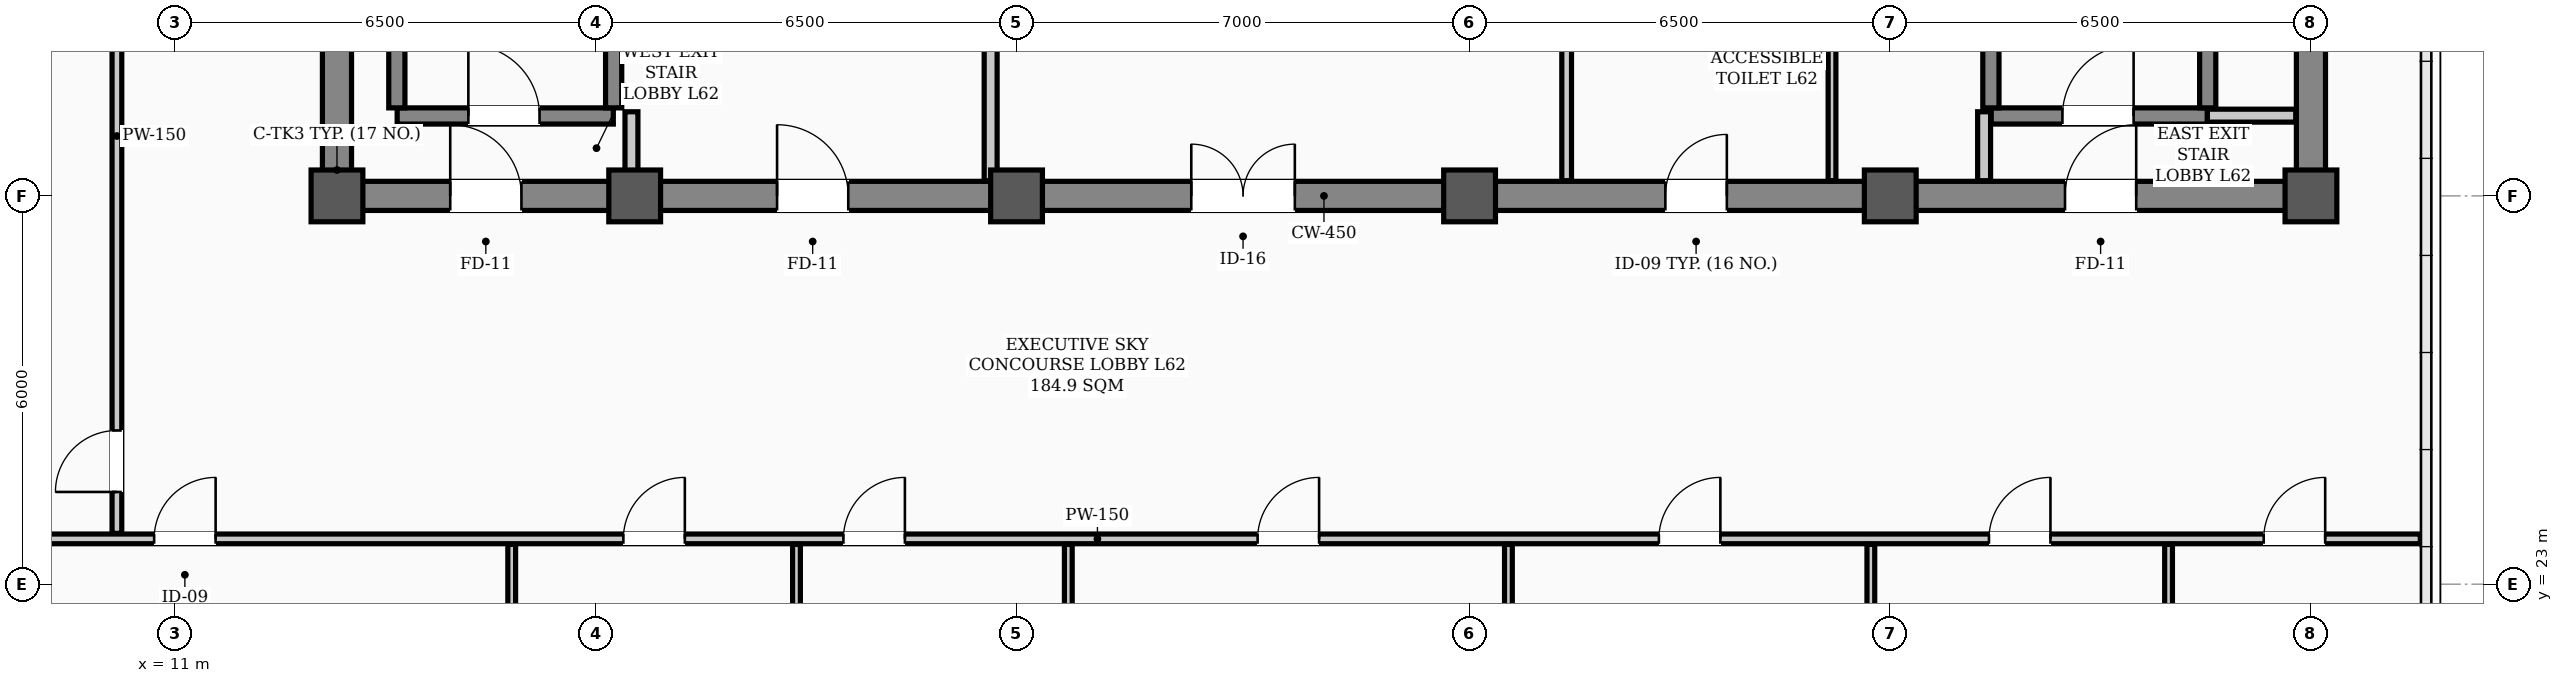
"""IFC4 building model, lengths in metres.
Left out: names, types, materials, properties, quantities, classifications, styles, units other than length and angle.
Written with IfcOpenShell. Run it as: python <this file> out.ifc"""

import sys

from ifc_helpers import new_model, si_unit, direction, frame, frame_2d, origin, origin_2d, place, context, subcontext, project, spatial, rectangle, hollow_rectangle, extrude, element, fill, save


model = new_model("IFC4")
c1 = context("Model", 3, precision=1e-05, world=origin(), true_north=direction((0.0, 1.0)))
c2 = subcontext(c1, "Body", "Model", "MODEL_VIEW")
j1 = project(units=[si_unit("LENGTHUNIT", "METRE"), si_unit("PLANEANGLEUNIT", "RADIAN")], contexts=[c1])
p1 = place(None, origin())
s1 = spatial("IfcSite", under=j1, at=p1, CompositionType="ELEMENT")
p2 = place(p1, origin())
s2 = spatial("IfcBuilding", under=s1, at=p2, CompositionType="ELEMENT")
p3 = place(p2, frame((0.0, 0.0, 250.1)))
s3 = spatial("IfcBuildingStorey", under=s2, at=p3, CompositionType="ELEMENT", Elevation=250.1)
for number, where, z_axis, x_axis in (
    (1, (13.5, 29.0, 0.0), (0.0, 0.0, 1.0), (1.0, 0.0, 0.0)),
    (2, (18.1, 29.0, 0.0), (0.0, 0.0, 1.0), (1.0, 0.0, 0.0)),
    (3, (24.0, 29.0, 0.0), (0.0, 0.0, 1.0), (1.0, 0.0, 0.0)),
    (4, (31.0, 29.0, 0.0), (0.0, 0.0, 1.0), (1.0, 0.0, 0.0)),
    (5, (37.5, 29.0, 0.0), (0.0, 0.0, 1.0), (1.0, 0.0, 0.0)),
    (6, (44.0, 29.0, 0.0), (0.0, 0.0, 1.0), (1.0, 0.0, 0.0)),
):
    element("IfcColumn", number, at=place(p3, frame(where, z_axis=z_axis, x_axis=x_axis)), inside=s3, PredefinedType="COLUMN", context=c2, shape_type="SweptSolid", body=[
        extrude(hollow_rectangle(XDim=0.8, YDim=0.8, WallThickness=0.032, InnerFilletRadius=0.016, OuterFilletRadius=0.048, at=origin_2d()), origin(), (0.0, 0.0, 1.0), 3.9),
    ])
p4 = place(p3, frame((13.5, 29.0, 0.0), z_axis=(0.0, 0.0, 1.0), x_axis=(1.0, 0.0, 0.0)))
e7 = element("IfcWall", 7, at=p4, inside=s3, PredefinedType="SHEAR", context=c2, shape_type="SweptSolid", body=[
    extrude(rectangle(XDim=30.5, YDim=0.45, at=frame_2d((15.25, 0.0))), origin(), (0.0, 0.0, 1.0), 3.72),
])
p5 = place(p4, frame((1.75, 0.0, 0.0)))
e8 = element("IfcOpeningElement", 8, at=p5, cuts=e7, PredefinedType="OPENING", context=c2, shape_type="SweptSolid", body=[
    extrude(rectangle(XDim=1.1, YDim=2.08, at=frame_2d((0.55, 1.04))), frame((0.0, 0.235, 0.0), z_axis=(0.0, -1.0, 0.0), x_axis=(1.0, 0.0, 0.0)), (0.0, 0.0, 1.0), 0.47),
])
p6 = place(p4, frame((26.7, 0.0, 0.0)))
e9 = element("IfcOpeningElement", 9, at=p6, cuts=e7, PredefinedType="OPENING", context=c2, shape_type="SweptSolid", body=[
    extrude(rectangle(XDim=1.1, YDim=2.08, at=frame_2d((0.55, 1.04))), frame((0.0, 0.235, 0.0), z_axis=(0.0, -1.0, 0.0), x_axis=(1.0, 0.0, 0.0)), (0.0, 0.0, 1.0), 0.47),
])
p7 = place(p4, frame((6.8, 0.0, 0.0)))
e10 = element("IfcOpeningElement", 10, at=p7, cuts=e7, PredefinedType="OPENING", context=c2, shape_type="SweptSolid", body=[
    extrude(rectangle(XDim=1.1, YDim=2.08, at=frame_2d((0.55, 1.04))), frame((0.0, 0.235, 0.0), z_axis=(0.0, -1.0, 0.0), x_axis=(1.0, 0.0, 0.0)), (0.0, 0.0, 1.0), 0.47),
])
p8 = place(p4, frame((13.2, 0.0, 0.0)))
e11 = element("IfcOpeningElement", 11, at=p8, cuts=e7, PredefinedType="OPENING", context=c2, shape_type="SweptSolid", body=[
    extrude(rectangle(XDim=1.6, YDim=2.08, at=frame_2d((0.8, 1.04))), frame((0.0, 0.235, 0.0), z_axis=(0.0, -1.0, 0.0), x_axis=(1.0, 0.0, 0.0)), (0.0, 0.0, 1.0), 0.47),
])
p9 = place(p4, frame((20.525, 0.0, 0.0)))
e12 = element("IfcOpeningElement", 12, at=p9, cuts=e7, PredefinedType="OPENING", context=c2, shape_type="SweptSolid", body=[
    extrude(rectangle(XDim=0.95, YDim=2.08, at=frame_2d((0.475, 1.04))), frame((0.0, 0.235, 0.0), z_axis=(0.0, -1.0, 0.0), x_axis=(1.0, 0.0, 0.0)), (0.0, 0.0, 1.0), 0.47),
])
for number, where, z_axis, x_axis in (
    (13, (13.5, 29.35, 0.0), (0.0, 0.0, 1.0), (0.0, 1.0, 0.0)),
    (14, (44.0, 29.35, 0.0), (0.0, 0.0, 1.0), (0.0, 1.0, 0.0)),
):
    element("IfcWall", number, at=place(p3, frame(where, z_axis=z_axis, x_axis=x_axis)), inside=s3, PredefinedType="SHEAR", context=c2, shape_type="SweptSolid", body=[
        extrude(rectangle(XDim=8.6, YDim=0.45, at=frame_2d((4.3, 0.0))), origin(), (0.0, 0.0, 1.0), 3.72),
    ])
p10 = place(p3, frame((14.43, 30.235, 0.0), z_axis=(0.0, 0.0, 1.0), x_axis=(1.0, 0.0, 0.0)))
e15 = element("IfcWall", 15, at=p10, inside=s3, PredefinedType="STANDARD", context=c2, shape_type="SweptSolid", body=[
    extrude(rectangle(XDim=3.34, YDim=0.25, at=frame_2d((1.67, 0.0))), origin(), (0.0, 0.0, 1.0), 3.72),
])
p11 = place(p10, frame((1.1, 0.0, 0.0)))
e16 = element("IfcOpeningElement", 16, at=p11, cuts=e15, PredefinedType="OPENING", context=c2, shape_type="SweptSolid", body=[
    extrude(rectangle(XDim=1.1, YDim=2.08, at=frame_2d((0.55, 1.04))), frame((0.0, 0.135, 0.0), z_axis=(0.0, -1.0, 0.0), x_axis=(1.0, 0.0, 0.0)), (0.0, 0.0, 1.0), 0.27),
])
for number, where, z_axis, x_axis in (
    (17, (14.425, 30.36, 0.0), (0.0, 0.0, 1.0), (0.0, 1.0, 0.0)),
    (18, (17.775, 30.36, 0.0), (0.0, 0.0, 1.0), (0.0, 1.0, 0.0)),
):
    element("IfcWall", number, at=place(p3, frame(where, z_axis=z_axis, x_axis=x_axis)), inside=s3, PredefinedType="STANDARD", context=c2, shape_type="SweptSolid", body=[
        extrude(rectangle(XDim=7.184, YDim=0.25, at=frame_2d((3.592, 0.0))), origin(), (0.0, 0.0, 1.0), 3.72),
    ])
p12 = place(p3, frame((39.06, 30.235, 0.0), z_axis=(0.0, 0.0, 1.0), x_axis=(1.0, 0.0, 0.0)))
e19 = element("IfcWall", 19, at=p12, inside=s3, PredefinedType="STANDARD", context=c2, shape_type="SweptSolid", body=[
    extrude(rectangle(XDim=3.34, YDim=0.25, at=frame_2d((1.67, 0.0))), origin(), (0.0, 0.0, 1.0), 3.72),
])
p13 = place(p12, frame((1.1, 0.0, 0.0)))
e20 = element("IfcOpeningElement", 20, at=p13, cuts=e19, PredefinedType="OPENING", context=c2, shape_type="SweptSolid", body=[
    extrude(rectangle(XDim=1.1, YDim=2.08, at=frame_2d((0.55, 1.04))), frame((0.0, 0.135, 0.0), z_axis=(0.0, -1.0, 0.0), x_axis=(1.0, 0.0, 0.0)), (0.0, 0.0, 1.0), 0.27),
])
for number, where, z_axis, x_axis in (
    (21, (39.055, 30.36, 0.0), (0.0, 0.0, 1.0), (0.0, 1.0, 0.0)),
    (22, (42.405, 30.36, 0.0), (0.0, 0.0, 1.0), (0.0, 1.0, 0.0)),
):
    element("IfcWall", number, at=place(p3, frame(where, z_axis=z_axis, x_axis=x_axis)), inside=s3, PredefinedType="STANDARD", context=c2, shape_type="SweptSolid", body=[
        extrude(rectangle(XDim=7.184, YDim=0.25, at=frame_2d((3.592, 0.0))), origin(), (0.0, 0.0, 1.0), 3.72),
    ])
p14 = place(p3, frame((42.4, 30.24, 0.0), z_axis=(0.0, 0.0, 1.0), x_axis=(1.0, 0.0, 0.0)))
e23 = element("IfcWall", 23, at=p14, inside=s3, PredefinedType="STANDARD", context=c2, shape_type="SweptSolid", body=[
    extrude(rectangle(XDim=1.365, YDim=0.2, at=frame_2d((0.683, 0.0))), origin(), (0.0, 0.0, 1.0), 3.72),
])
p15 = place(p3, frame((4.81, 23.7, 0.0), z_axis=(0.0, 0.0, 1.0), x_axis=(1.0, 0.0, 0.0)))
e24 = element("IfcWall", 24, at=p15, inside=s3, PredefinedType="PARTITIONING", context=c2, shape_type="SweptSolid", body=[
    extrude(rectangle(XDim=40.88, YDim=0.15, at=frame_2d((20.44, 0.0))), origin(), (0.0, 0.0, 1.0), 3.2),
])
p16 = place(p15, frame((5.865, 0.0, 0.0)))
e25 = element("IfcOpeningElement", 25, at=p16, cuts=e24, PredefinedType="OPENING", context=c2, shape_type="SweptSolid", body=[
    extrude(rectangle(XDim=0.95, YDim=2.08, at=frame_2d((0.475, 1.04))), frame((0.0, 0.085, 0.0), z_axis=(0.0, -1.0, 0.0), x_axis=(1.0, 0.0, 0.0)), (0.0, 0.0, 1.0), 0.17),
])
p17 = place(p15, frame((13.115, 0.0, 0.0)))
e26 = element("IfcOpeningElement", 26, at=p17, cuts=e24, PredefinedType="OPENING", context=c2, shape_type="SweptSolid", body=[
    extrude(rectangle(XDim=0.95, YDim=2.08, at=frame_2d((0.475, 1.04))), frame((0.0, 0.085, 0.0), z_axis=(0.0, -1.0, 0.0), x_axis=(1.0, 0.0, 0.0)), (0.0, 0.0, 1.0), 0.17),
])
p18 = place(p15, frame((16.515, 0.0, 0.0)))
e27 = element("IfcOpeningElement", 27, at=p18, cuts=e24, PredefinedType="OPENING", context=c2, shape_type="SweptSolid", body=[
    extrude(rectangle(XDim=0.95, YDim=2.08, at=frame_2d((0.475, 1.04))), frame((0.0, 0.085, 0.0), z_axis=(0.0, -1.0, 0.0), x_axis=(1.0, 0.0, 0.0)), (0.0, 0.0, 1.0), 0.17),
])
p19 = place(p15, frame((22.915, 0.0, 0.0)))
e28 = element("IfcOpeningElement", 28, at=p19, cuts=e24, PredefinedType="OPENING", context=c2, shape_type="SweptSolid", body=[
    extrude(rectangle(XDim=0.95, YDim=2.08, at=frame_2d((0.475, 1.04))), frame((0.0, 0.085, 0.0), z_axis=(0.0, -1.0, 0.0), x_axis=(1.0, 0.0, 0.0)), (0.0, 0.0, 1.0), 0.17),
])
p20 = place(p15, frame((29.115, 0.0, 0.0)))
e29 = element("IfcOpeningElement", 29, at=p20, cuts=e24, PredefinedType="OPENING", context=c2, shape_type="SweptSolid", body=[
    extrude(rectangle(XDim=0.95, YDim=2.08, at=frame_2d((0.475, 1.04))), frame((0.0, 0.085, 0.0), z_axis=(0.0, -1.0, 0.0), x_axis=(1.0, 0.0, 0.0)), (0.0, 0.0, 1.0), 0.17),
])
p21 = place(p15, frame((34.215, 0.0, 0.0)))
e30 = element("IfcOpeningElement", 30, at=p21, cuts=e24, PredefinedType="OPENING", context=c2, shape_type="SweptSolid", body=[
    extrude(rectangle(XDim=0.95, YDim=2.08, at=frame_2d((0.475, 1.04))), frame((0.0, 0.085, 0.0), z_axis=(0.0, -1.0, 0.0), x_axis=(1.0, 0.0, 0.0)), (0.0, 0.0, 1.0), 0.17),
])
p22 = place(p15, frame((38.46, 0.0, 0.0)))
e31 = element("IfcOpeningElement", 31, at=p22, cuts=e24, PredefinedType="OPENING", context=c2, shape_type="SweptSolid", body=[
    extrude(rectangle(XDim=0.95, YDim=2.08, at=frame_2d((0.475, 1.04))), frame((0.0, 0.085, 0.0), z_axis=(0.0, -1.0, 0.0), x_axis=(1.0, 0.0, 0.0)), (0.0, 0.0, 1.0), 0.17),
])
p23 = place(p3, frame((18.05, 29.235, 0.0), z_axis=(0.0, 0.0, 1.0), x_axis=(0.0, 1.0, 0.0)))
e32 = element("IfcWall", 32, at=p23, inside=s3, PredefinedType="STANDARD", context=c2, shape_type="SweptSolid", body=[
    extrude(rectangle(XDim=1.065, YDim=0.2, at=frame_2d((0.532, 0.0))), origin(), (0.0, 0.0, 1.0), 3.35),
])
p24 = place(p3, frame((38.95, 29.235, 0.0), z_axis=(0.0, 0.0, 1.0), x_axis=(0.0, 1.0, 0.0)))
e33 = element("IfcWall", 33, at=p24, inside=s3, PredefinedType="STANDARD", context=c2, shape_type="SweptSolid", body=[
    extrude(rectangle(XDim=1.065, YDim=0.2, at=frame_2d((0.532, 0.0))), origin(), (0.0, 0.0, 1.0), 3.72),
])
p25 = place(p3, frame((23.6, 29.235, 0.0), z_axis=(0.0, 0.0, 1.0), x_axis=(0.0, 1.0, 0.0)))
e34 = element("IfcWall", 34, at=p25, inside=s3, PredefinedType="STANDARD", context=c2, shape_type="SweptSolid", body=[
    extrude(rectangle(XDim=5.465, YDim=0.2, at=frame_2d((2.732, 0.0))), origin(), (0.0, 0.0, 1.0), 3.2),
])
p26 = place(p3, frame((32.5, 29.235, 0.0), z_axis=(0.0, 0.0, 1.0), x_axis=(0.0, 1.0, 0.0)))
e35 = element("IfcWall", 35, at=p26, inside=s3, PredefinedType="PARTITIONING", context=c2, shape_type="SweptSolid", body=[
    extrude(rectangle(XDim=2.53, YDim=0.15, at=frame_2d((1.265, 0.0))), origin(), (0.0, 0.0, 1.0), 3.35),
])
p27 = place(p3, frame((36.6, 29.235, 0.0), z_axis=(0.0, 0.0, 1.0), x_axis=(0.0, 1.0, 0.0)))
e36 = element("IfcWall", 36, at=p27, inside=s3, PredefinedType="PARTITIONING", context=c2, shape_type="SweptSolid", body=[
    extrude(rectangle(XDim=2.53, YDim=0.12, at=frame_2d((1.265, 0.0))), origin(), (0.0, 0.0, 1.0), 3.35),
])
p28 = place(p3, frame((10.1, 23.785, 0.0), z_axis=(0.0, 0.0, 1.0), x_axis=(0.0, 1.0, 0.0)))
e37 = element("IfcWall", 37, at=p28, inside=s3, PredefinedType="PARTITIONING", context=c2, shape_type="SweptSolid", body=[
    extrude(rectangle(XDim=12.28, YDim=0.15, at=frame_2d((6.14, 0.0))), origin(), (0.0, 0.0, 1.0), 3.1),
])
p29 = place(p28, frame((0.64, 0.0, 0.0)))
e38 = element("IfcOpeningElement", 38, at=p29, cuts=e37, PredefinedType="OPENING", context=c2, shape_type="SweptSolid", body=[
    extrude(rectangle(XDim=0.95, YDim=2.08, at=frame_2d((0.475, 1.04))), frame((0.0, 0.085, 0.0), z_axis=(0.0, -1.0, 0.0), x_axis=(1.0, 0.0, 0.0)), (0.0, 0.0, 1.0), 0.17),
])
for number, where, z_axis, x_axis in (
    (39, (16.2, 12.41, 0.0), (0.0, 0.0, 1.0), (0.0, 1.0, 0.0)),
    (40, (20.6, 12.41, 0.0), (0.0, 0.0, 1.0), (0.0, 1.0, 0.0)),
):
    element("IfcWall", number, at=place(p3, frame(where, z_axis=z_axis, x_axis=x_axis)), inside=s3, PredefinedType="PARTITIONING", context=c2, shape_type="SweptSolid", body=[
        extrude(rectangle(XDim=11.205, YDim=0.12, at=frame_2d((5.603, 0.0))), origin(), (0.0, 0.0, 1.0), 3.1),
    ])
p30 = place(p3, frame((24.8, 14.17, 0.0), z_axis=(0.0, 0.0, 1.0), x_axis=(0.0, 1.0, 0.0)))
e41 = element("IfcWall", 41, at=p30, inside=s3, PredefinedType="PARTITIONING", context=c2, shape_type="SweptSolid", body=[
    extrude(rectangle(XDim=9.445, YDim=0.12, at=frame_2d((4.723, 0.0))), origin(), (0.0, 0.0, 1.0), 3.1),
])
for number, where, z_axis, x_axis in (
    (42, (31.6, 12.41, 0.0), (0.0, 0.0, 1.0), (0.0, 1.0, 0.0)),
    (43, (37.2, 12.41, 0.0), (0.0, 0.0, 1.0), (0.0, 1.0, 0.0)),
):
    element("IfcWall", number, at=place(p3, frame(where, z_axis=z_axis, x_axis=x_axis)), inside=s3, PredefinedType="PARTITIONING", context=c2, shape_type="SweptSolid", body=[
        extrude(rectangle(XDim=11.205, YDim=0.12, at=frame_2d((5.603, 0.0))), origin(), (0.0, 0.0, 1.0), 3.1),
    ])
p31 = place(p3, frame((41.8, 12.41, 0.0), z_axis=(0.0, 0.0, 1.0), x_axis=(0.0, 1.0, 0.0)))
e44 = element("IfcWall", 44, at=p31, inside=s3, PredefinedType="PARTITIONING", context=c2, shape_type="SweptSolid", body=[
    extrude(rectangle(XDim=11.205, YDim=0.12, at=frame_2d((5.603, 0.0))), origin(), (0.0, 0.0, 1.0), 3.72),
])
p32 = place(p11, origin())
e45 = element("IfcDoor", 45, at=p32, inside=s3, OperationType="SINGLE_SWING_LEFT", PredefinedType="DOOR", context=c2, shape_type="SweptSolid", body=[
    extrude(rectangle(XDim=1.1, YDim=2.08, at=frame_2d((0.55, 1.04))), frame((0.0, 0.025, 0.0), z_axis=(0.0, -1.0, 0.0), x_axis=(1.0, 0.0, 0.0)), (0.0, 0.0, 1.0), 0.05),
])
fill(e16, e45)
p33 = place(p13, origin())
e46 = element("IfcDoor", 46, at=p33, inside=s3, OperationType="SINGLE_SWING_RIGHT", PredefinedType="DOOR", context=c2, shape_type="SweptSolid", body=[
    extrude(rectangle(XDim=1.1, YDim=2.08, at=frame_2d((0.55, 1.04))), frame((0.0, 0.025, 0.0), z_axis=(0.0, -1.0, 0.0), x_axis=(1.0, 0.0, 0.0)), (0.0, 0.0, 1.0), 0.05),
])
fill(e20, e46)
p34 = place(p5, origin())
e47 = element("IfcDoor", 47, at=p34, inside=s3, OperationType="SINGLE_SWING_LEFT", PredefinedType="DOOR", context=c2, shape_type="SweptSolid", body=[
    extrude(rectangle(XDim=1.1, YDim=2.08, at=frame_2d((0.55, 1.04))), frame((0.0, 0.025, 0.0), z_axis=(0.0, -1.0, 0.0), x_axis=(1.0, 0.0, 0.0)), (0.0, 0.0, 1.0), 0.05),
])
fill(e8, e47)
p35 = place(p6, origin())
e48 = element("IfcDoor", 48, at=p35, inside=s3, OperationType="SINGLE_SWING_RIGHT", PredefinedType="DOOR", context=c2, shape_type="SweptSolid", body=[
    extrude(rectangle(XDim=1.1, YDim=2.08, at=frame_2d((0.55, 1.04))), frame((0.0, 0.025, 0.0), z_axis=(0.0, -1.0, 0.0), x_axis=(1.0, 0.0, 0.0)), (0.0, 0.0, 1.0), 0.05),
])
fill(e9, e48)
p36 = place(p7, origin())
e49 = element("IfcDoor", 49, at=p36, inside=s3, OperationType="SINGLE_SWING_LEFT", PredefinedType="DOOR", context=c2, shape_type="SweptSolid", body=[
    extrude(rectangle(XDim=1.1, YDim=2.08, at=frame_2d((0.55, 1.04))), frame((0.0, 0.025, 0.0), z_axis=(0.0, -1.0, 0.0), x_axis=(1.0, 0.0, 0.0)), (0.0, 0.0, 1.0), 0.05),
])
fill(e10, e49)
p37 = place(p8, origin())
e50 = element("IfcDoor", 50, at=p37, inside=s3, OperationType="DOUBLE_DOOR_SINGLE_SWING", PredefinedType="DOOR", context=c2, shape_type="SweptSolid", body=[
    extrude(rectangle(XDim=1.6, YDim=2.08, at=frame_2d((0.8, 1.04))), frame((0.0, 0.025, 0.0), z_axis=(0.0, -1.0, 0.0), x_axis=(1.0, 0.0, 0.0)), (0.0, 0.0, 1.0), 0.05),
])
fill(e11, e50)
p38 = place(p9, origin())
e51 = element("IfcDoor", 51, at=p38, inside=s3, OperationType="SINGLE_SWING_RIGHT", PredefinedType="DOOR", context=c2, shape_type="SweptSolid", body=[
    extrude(rectangle(XDim=0.95, YDim=2.08, at=frame_2d((0.475, 1.04))), frame((0.0, 0.025, 0.0), z_axis=(0.0, -1.0, 0.0), x_axis=(1.0, 0.0, 0.0)), (0.0, 0.0, 1.0), 0.05),
])
fill(e12, e51)
p39 = place(p16, origin())
e52 = element("IfcDoor", 52, at=p39, inside=s3, OperationType="SINGLE_SWING_RIGHT", PredefinedType="DOOR", context=c2, shape_type="SweptSolid", body=[
    extrude(rectangle(XDim=0.95, YDim=2.08, at=frame_2d((0.475, 1.04))), frame((0.0, 0.025, 0.0), z_axis=(0.0, -1.0, 0.0), x_axis=(1.0, 0.0, 0.0)), (0.0, 0.0, 1.0), 0.05),
])
fill(e25, e52)
p40 = place(p17, origin())
e53 = element("IfcDoor", 53, at=p40, inside=s3, OperationType="SINGLE_SWING_RIGHT", PredefinedType="DOOR", context=c2, shape_type="SweptSolid", body=[
    extrude(rectangle(XDim=0.95, YDim=2.08, at=frame_2d((0.475, 1.04))), frame((0.0, 0.025, 0.0), z_axis=(0.0, -1.0, 0.0), x_axis=(1.0, 0.0, 0.0)), (0.0, 0.0, 1.0), 0.05),
])
fill(e26, e53)
p41 = place(p18, origin())
e54 = element("IfcDoor", 54, at=p41, inside=s3, OperationType="SINGLE_SWING_RIGHT", PredefinedType="DOOR", context=c2, shape_type="SweptSolid", body=[
    extrude(rectangle(XDim=0.95, YDim=2.08, at=frame_2d((0.475, 1.04))), frame((0.0, 0.025, 0.0), z_axis=(0.0, -1.0, 0.0), x_axis=(1.0, 0.0, 0.0)), (0.0, 0.0, 1.0), 0.05),
])
fill(e27, e54)
p42 = place(p19, origin())
e55 = element("IfcDoor", 55, at=p42, inside=s3, OperationType="SINGLE_SWING_RIGHT", PredefinedType="DOOR", context=c2, shape_type="SweptSolid", body=[
    extrude(rectangle(XDim=0.95, YDim=2.08, at=frame_2d((0.475, 1.04))), frame((0.0, 0.025, 0.0), z_axis=(0.0, -1.0, 0.0), x_axis=(1.0, 0.0, 0.0)), (0.0, 0.0, 1.0), 0.05),
])
fill(e28, e55)
p43 = place(p20, origin())
e56 = element("IfcDoor", 56, at=p43, inside=s3, OperationType="SINGLE_SWING_RIGHT", PredefinedType="DOOR", context=c2, shape_type="SweptSolid", body=[
    extrude(rectangle(XDim=0.95, YDim=2.08, at=frame_2d((0.475, 1.04))), frame((0.0, 0.025, 0.0), z_axis=(0.0, -1.0, 0.0), x_axis=(1.0, 0.0, 0.0)), (0.0, 0.0, 1.0), 0.05),
])
fill(e29, e56)
p44 = place(p21, origin())
e57 = element("IfcDoor", 57, at=p44, inside=s3, OperationType="SINGLE_SWING_RIGHT", PredefinedType="DOOR", context=c2, shape_type="SweptSolid", body=[
    extrude(rectangle(XDim=0.95, YDim=2.08, at=frame_2d((0.475, 1.04))), frame((0.0, 0.025, 0.0), z_axis=(0.0, -1.0, 0.0), x_axis=(1.0, 0.0, 0.0)), (0.0, 0.0, 1.0), 0.05),
])
fill(e30, e57)
p45 = place(p22, origin())
e58 = element("IfcDoor", 58, at=p45, inside=s3, OperationType="SINGLE_SWING_RIGHT", PredefinedType="DOOR", context=c2, shape_type="SweptSolid", body=[
    extrude(rectangle(XDim=0.95, YDim=2.08, at=frame_2d((0.475, 1.04))), frame((0.0, 0.025, 0.0), z_axis=(0.0, -1.0, 0.0), x_axis=(1.0, 0.0, 0.0)), (0.0, 0.0, 1.0), 0.05),
])
fill(e31, e58)
p46 = place(p29, origin())
e59 = element("IfcDoor", 59, at=p46, inside=s3, OperationType="SINGLE_SWING_LEFT", PredefinedType="DOOR", context=c2, shape_type="SweptSolid", body=[
    extrude(rectangle(XDim=0.95, YDim=2.08, at=frame_2d((0.475, 1.04))), frame((0.0, 0.025, 0.0), z_axis=(0.0, -1.0, 0.0), x_axis=(1.0, 0.0, 0.0)), (0.0, 0.0, 1.0), 0.05),
])
fill(e38, e59)
save(model, sys.argv[1])
